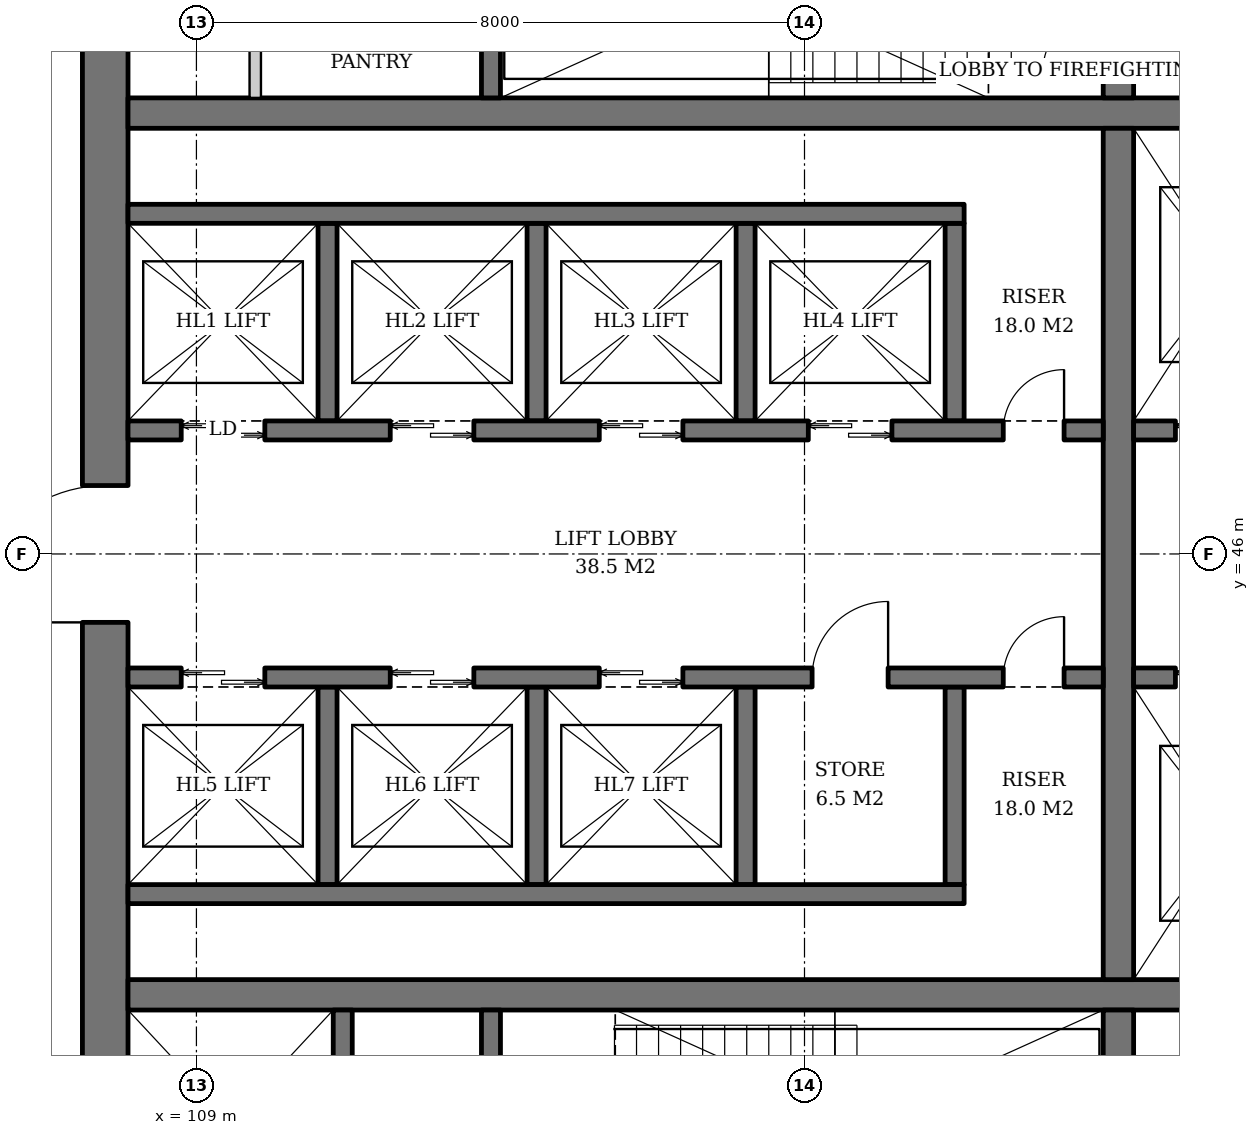
"""IFC4 building model, lengths in metres.
Left out: names, types, materials, properties, quantities, classifications, styles, units other than length and angle.
Written with IfcOpenShell. Run it as: python <this file> out.ifc"""

import sys

from ifc_helpers import new_model, si_unit, direction, frame, frame_2d, origin, place, context, subcontext, project, spatial, rectangle, extrude, element, fill, save


model = new_model("IFC4")
c1 = context("Model", 3, precision=1e-05, world=origin(), true_north=direction((0.0, 1.0)))
c2 = subcontext(c1, "Body", "Model", "MODEL_VIEW")
j1 = project(units=[si_unit("LENGTHUNIT", "METRE"), si_unit("PLANEANGLEUNIT", "RADIAN")], contexts=[c1])
p1 = place(None, origin())
s1 = spatial("IfcSite", under=j1, at=p1, CompositionType="ELEMENT")
p2 = place(p1, origin())
s2 = spatial("IfcBuilding", under=s1, at=p2, CompositionType="ELEMENT")
p3 = place(p2, frame((0.0, 0.0, 78.0)))
s3 = spatial("IfcBuildingStorey", under=s2, at=p3, CompositionType="ELEMENT", Elevation=78.0)
p4 = place(p3, frame((107.8, 37.1, 0.0), z_axis=(0.0, 0.0, 1.0), x_axis=(0.0, 1.0, 0.0)))
e1 = element("IfcWall", 1, at=p4, inside=s3, PredefinedType="SHEAR", context=c2, shape_type="SweptSolid", body=[
    extrude(rectangle(XDim=17.8, YDim=0.6, at=frame_2d((8.9, 0.0))), origin(), (0.0, 0.0, 1.0), 3.8),
])
p5 = place(p4, frame((8.0, 0.0, 0.0)))
e2 = element("IfcOpeningElement", 2, at=p5, cuts=e1, PredefinedType="OPENING", context=c2, shape_type="SweptSolid", body=[
    extrude(rectangle(XDim=1.8, YDim=2.4, at=frame_2d((0.9, 1.2))), frame((0.0, 0.31, 0.0), z_axis=(0.0, -1.0, 0.0), x_axis=(1.0, 0.0, 0.0)), (0.0, 0.0, 1.0), 0.62),
])
for number, where, z_axis, x_axis in (
    (3, (108.1, 40.2, 0.0), (0.0, 0.0, 1.0), (1.0, 0.0, 0.0)),
    (4, (108.1, 51.8, 0.0), (0.0, 0.0, 1.0), (1.0, 0.0, 0.0)),
):
    element("IfcWall", number, at=place(p3, frame(where, z_axis=z_axis, x_axis=x_axis)), inside=s3, PredefinedType="SHEAR", context=c2, shape_type="SweptSolid", body=[
        extrude(rectangle(XDim=17.8, YDim=0.4, at=frame_2d((8.9, 0.0))), origin(), (0.0, 0.0, 1.0), 3.8),
    ])
p6 = place(p3, frame((121.13, 37.1, 0.0), z_axis=(0.0, 0.0, 1.0), x_axis=(0.0, 1.0, 0.0)))
e5 = element("IfcWall", 5, at=p6, inside=s3, PredefinedType="SHEAR", context=c2, shape_type="SweptSolid", body=[
    extrude(rectangle(XDim=2.9, YDim=0.4, at=frame_2d((1.45, 0.0))), origin(), (0.0, 0.0, 1.0), 3.8),
])
p7 = place(p3, frame((121.13, 40.4, 0.0), z_axis=(0.0, 0.0, 1.0), x_axis=(0.0, 1.0, 0.0)))
e6 = element("IfcWall", 6, at=p7, inside=s3, PredefinedType="SHEAR", context=c2, shape_type="SweptSolid", body=[
    extrude(rectangle(XDim=11.2, YDim=0.4, at=frame_2d((5.6, 0.0))), origin(), (0.0, 0.0, 1.0), 3.8),
])
p8 = place(p3, frame((121.13, 52.0, 0.0), z_axis=(0.0, 0.0, 1.0), x_axis=(0.0, 1.0, 0.0)))
e7 = element("IfcWall", 7, at=p8, inside=s3, PredefinedType="SHEAR", context=c2, shape_type="SweptSolid", body=[
    extrude(rectangle(XDim=2.9, YDim=0.4, at=frame_2d((1.45, 0.0))), origin(), (0.0, 0.0, 1.0), 3.8),
])
p9 = place(p8, frame((0.3, 0.0, 0.0)))
e8 = element("IfcOpeningElement", 8, at=p9, cuts=e7, PredefinedType="OPENING", context=c2, shape_type="SweptSolid", body=[
    extrude(rectangle(XDim=1.0, YDim=2.1, at=frame_2d((0.5, 1.05))), frame((0.0, 0.21, 0.0), z_axis=(0.0, -1.0, 0.0), x_axis=(1.0, 0.0, 0.0)), (0.0, 0.0, 1.0), 0.42),
])
p10 = place(p3, frame((110.925, 37.1, 0.0), z_axis=(0.0, 0.0, 1.0), x_axis=(0.0, 1.0, 0.0)))
e9 = element("IfcWall", 9, at=p10, inside=s3, PredefinedType="SHEAR", context=c2, shape_type="SweptSolid", body=[
    extrude(rectangle(XDim=2.9, YDim=0.25, at=frame_2d((1.45, 0.0))), origin(), (0.0, 0.0, 1.0), 3.8),
])
p11 = place(p10, frame((0.8, 0.0, 0.0)))
e10 = element("IfcOpeningElement", 10, at=p11, cuts=e9, PredefinedType="OPENING", context=c2, shape_type="SweptSolid", body=[
    extrude(rectangle(XDim=1.3, YDim=2.2, at=frame_2d((0.65, 1.1))), frame((0.0, 0.135, 0.0), z_axis=(0.0, -1.0, 0.0), x_axis=(1.0, 0.0, 0.0)), (0.0, 0.0, 1.0), 0.27),
])
p12 = place(p3, frame((112.875, 37.1, 0.0), z_axis=(0.0, 0.0, 1.0), x_axis=(0.0, 1.0, 0.0)))
e11 = element("IfcWall", 11, at=p12, inside=s3, PredefinedType="SHEAR", context=c2, shape_type="SweptSolid", body=[
    extrude(rectangle(XDim=2.9, YDim=0.25, at=frame_2d((1.45, 0.0))), origin(), (0.0, 0.0, 1.0), 3.8),
])
p13 = place(p12, frame((0.75, 0.0, 0.0)))
e12 = element("IfcOpeningElement", 12, at=p13, cuts=e11, PredefinedType="OPENING", context=c2, shape_type="SweptSolid", body=[
    extrude(rectangle(XDim=1.2, YDim=2.1, at=frame_2d((0.6, 1.05))), frame((0.0, 0.135, 0.0), z_axis=(0.0, -1.0, 0.0), x_axis=(1.0, 0.0, 0.0)), (0.0, 0.0, 1.0), 0.27),
])
p14 = place(p3, frame((112.875, 52.0, 0.0), z_axis=(0.0, 0.0, 1.0), x_axis=(0.0, 1.0, 0.0)))
e13 = element("IfcWall", 13, at=p14, inside=s3, PredefinedType="SHEAR", context=c2, shape_type="SweptSolid", body=[
    extrude(rectangle(XDim=2.9, YDim=0.25, at=frame_2d((1.45, 0.0))), origin(), (0.0, 0.0, 1.0), 3.8),
])
for number, where, z_axis, x_axis in (
    (14, (110.725, 47.75, 0.0), (0.0, 0.0, 1.0), (0.0, 1.0, 0.0)),
    (15, (113.475, 47.75, 0.0), (0.0, 0.0, 1.0), (0.0, 1.0, 0.0)),
    (16, (116.225, 47.75, 0.0), (0.0, 0.0, 1.0), (0.0, 1.0, 0.0)),
    (17, (118.975, 47.75, 0.0), (0.0, 0.0, 1.0), (0.0, 1.0, 0.0)),
):
    element("IfcWall", number, at=place(p3, frame(where, z_axis=z_axis, x_axis=x_axis)), inside=s3, PredefinedType="SHEAR", context=c2, shape_type="SweptSolid", body=[
        extrude(rectangle(XDim=2.6, YDim=0.25, at=frame_2d((1.3, 0.0))), origin(), (0.0, 0.0, 1.0), 3.8),
    ])
p15 = place(p3, frame((108.1, 50.475, 0.0), z_axis=(0.0, 0.0, 1.0), x_axis=(1.0, 0.0, 0.0)))
e18 = element("IfcWall", 18, at=p15, inside=s3, PredefinedType="SHEAR", context=c2, shape_type="SweptSolid", body=[
    extrude(rectangle(XDim=11.0, YDim=0.25, at=frame_2d((5.5, 0.0))), origin(), (0.0, 0.0, 1.0), 3.8),
])
p16 = place(p3, frame((108.1, 47.625, 0.0), z_axis=(0.0, 0.0, 1.0), x_axis=(1.0, 0.0, 0.0)))
e19 = element("IfcWall", 19, at=p16, inside=s3, PredefinedType="SHEAR", context=c2, shape_type="SweptSolid", body=[
    extrude(rectangle(XDim=12.83, YDim=0.25, at=frame_2d((6.415, 0.0))), origin(), (0.0, 0.0, 1.0), 3.8),
])
p17 = place(p16, frame((0.7, 0.0, 0.0)))
e20 = element("IfcOpeningElement", 20, at=p17, cuts=e19, PredefinedType="OPENING", context=c2, shape_type="SweptSolid", body=[
    extrude(rectangle(XDim=1.1, YDim=2.2, at=frame_2d((0.55, 1.1))), frame((0.0, 0.135, 0.0), z_axis=(0.0, -1.0, 0.0), x_axis=(1.0, 0.0, 0.0)), (0.0, 0.0, 1.0), 0.27),
])
p18 = place(p16, frame((3.45, 0.0, 0.0)))
e21 = element("IfcOpeningElement", 21, at=p18, cuts=e19, PredefinedType="OPENING", context=c2, shape_type="SweptSolid", body=[
    extrude(rectangle(XDim=1.1, YDim=2.2, at=frame_2d((0.55, 1.1))), frame((0.0, 0.135, 0.0), z_axis=(0.0, -1.0, 0.0), x_axis=(1.0, 0.0, 0.0)), (0.0, 0.0, 1.0), 0.27),
])
p19 = place(p16, frame((6.2, 0.0, 0.0)))
e22 = element("IfcOpeningElement", 22, at=p19, cuts=e19, PredefinedType="OPENING", context=c2, shape_type="SweptSolid", body=[
    extrude(rectangle(XDim=1.1, YDim=2.2, at=frame_2d((0.55, 1.1))), frame((0.0, 0.135, 0.0), z_axis=(0.0, -1.0, 0.0), x_axis=(1.0, 0.0, 0.0)), (0.0, 0.0, 1.0), 0.27),
])
p20 = place(p16, frame((8.95, 0.0, 0.0)))
e23 = element("IfcOpeningElement", 23, at=p20, cuts=e19, PredefinedType="OPENING", context=c2, shape_type="SweptSolid", body=[
    extrude(rectangle(XDim=1.1, YDim=2.2, at=frame_2d((0.55, 1.1))), frame((0.0, 0.135, 0.0), z_axis=(0.0, -1.0, 0.0), x_axis=(1.0, 0.0, 0.0)), (0.0, 0.0, 1.0), 0.27),
])
p21 = place(p16, frame((11.515, 0.0, 0.0)))
e24 = element("IfcOpeningElement", 24, at=p21, cuts=e19, PredefinedType="OPENING", context=c2, shape_type="SweptSolid", body=[
    extrude(rectangle(XDim=0.8, YDim=2.0, at=frame_2d((0.4, 1.0))), frame((0.0, 0.135, 0.0), z_axis=(0.0, -1.0, 0.0), x_axis=(1.0, 0.0, 0.0)), (0.0, 0.0, 1.0), 0.27),
])
for number, where, z_axis, x_axis in (
    (25, (110.725, 44.25, 0.0), (0.0, 0.0, 1.0), (0.0, -1.0, 0.0)),
    (26, (113.475, 44.25, 0.0), (0.0, 0.0, 1.0), (0.0, -1.0, 0.0)),
    (27, (116.225, 44.25, 0.0), (0.0, 0.0, 1.0), (0.0, -1.0, 0.0)),
    (28, (118.975, 44.25, 0.0), (0.0, 0.0, 1.0), (0.0, -1.0, 0.0)),
):
    element("IfcWall", number, at=place(p3, frame(where, z_axis=z_axis, x_axis=x_axis)), inside=s3, PredefinedType="SHEAR", context=c2, shape_type="SweptSolid", body=[
        extrude(rectangle(XDim=2.6, YDim=0.25, at=frame_2d((1.3, 0.0))), origin(), (0.0, 0.0, 1.0), 3.8),
    ])
p22 = place(p3, frame((108.1, 41.525, 0.0), z_axis=(0.0, 0.0, 1.0), x_axis=(1.0, 0.0, 0.0)))
e29 = element("IfcWall", 29, at=p22, inside=s3, PredefinedType="SHEAR", context=c2, shape_type="SweptSolid", body=[
    extrude(rectangle(XDim=11.0, YDim=0.25, at=frame_2d((5.5, 0.0))), origin(), (0.0, 0.0, 1.0), 3.8),
])
p23 = place(p3, frame((108.1, 44.375, 0.0), z_axis=(0.0, 0.0, 1.0), x_axis=(1.0, 0.0, 0.0)))
e30 = element("IfcWall", 30, at=p23, inside=s3, PredefinedType="SHEAR", context=c2, shape_type="SweptSolid", body=[
    extrude(rectangle(XDim=12.83, YDim=0.25, at=frame_2d((6.415, 0.0))), origin(), (0.0, 0.0, 1.0), 3.8),
])
p24 = place(p23, frame((0.7, 0.0, 0.0)))
e31 = element("IfcOpeningElement", 31, at=p24, cuts=e30, PredefinedType="OPENING", context=c2, shape_type="SweptSolid", body=[
    extrude(rectangle(XDim=1.1, YDim=2.2, at=frame_2d((0.55, 1.1))), frame((0.0, 0.135, 0.0), z_axis=(0.0, -1.0, 0.0), x_axis=(1.0, 0.0, 0.0)), (0.0, 0.0, 1.0), 0.27),
])
p25 = place(p23, frame((3.45, 0.0, 0.0)))
e32 = element("IfcOpeningElement", 32, at=p25, cuts=e30, PredefinedType="OPENING", context=c2, shape_type="SweptSolid", body=[
    extrude(rectangle(XDim=1.1, YDim=2.2, at=frame_2d((0.55, 1.1))), frame((0.0, 0.135, 0.0), z_axis=(0.0, -1.0, 0.0), x_axis=(1.0, 0.0, 0.0)), (0.0, 0.0, 1.0), 0.27),
])
p26 = place(p23, frame((6.2, 0.0, 0.0)))
e33 = element("IfcOpeningElement", 33, at=p26, cuts=e30, PredefinedType="OPENING", context=c2, shape_type="SweptSolid", body=[
    extrude(rectangle(XDim=1.1, YDim=2.2, at=frame_2d((0.55, 1.1))), frame((0.0, 0.135, 0.0), z_axis=(0.0, -1.0, 0.0), x_axis=(1.0, 0.0, 0.0)), (0.0, 0.0, 1.0), 0.27),
])
p27 = place(p23, frame((9.0, 0.0, 0.0)))
e34 = element("IfcOpeningElement", 34, at=p27, cuts=e30, PredefinedType="OPENING", context=c2, shape_type="SweptSolid", body=[
    extrude(rectangle(XDim=1.0, YDim=2.1, at=frame_2d((0.5, 1.05))), frame((0.0, 0.135, 0.0), z_axis=(0.0, -1.0, 0.0), x_axis=(1.0, 0.0, 0.0)), (0.0, 0.0, 1.0), 0.27),
])
p28 = place(p23, frame((11.515, 0.0, 0.0)))
e35 = element("IfcOpeningElement", 35, at=p28, cuts=e30, PredefinedType="OPENING", context=c2, shape_type="SweptSolid", body=[
    extrude(rectangle(XDim=0.8, YDim=2.0, at=frame_2d((0.4, 1.0))), frame((0.0, 0.135, 0.0), z_axis=(0.0, -1.0, 0.0), x_axis=(1.0, 0.0, 0.0)), (0.0, 0.0, 1.0), 0.27),
])
p29 = place(p3, frame((121.33, 47.625, 0.0), z_axis=(0.0, 0.0, 1.0), x_axis=(1.0, 0.0, 0.0)))
e36 = element("IfcWall", 36, at=p29, inside=s3, PredefinedType="SHEAR", context=c2, shape_type="SweptSolid", body=[
    extrude(rectangle(XDim=4.57, YDim=0.25, at=frame_2d((2.285, 0.0))), origin(), (0.0, 0.0, 1.0), 3.8),
])
p30 = place(p29, frame((0.55, 0.0, 0.0)))
e37 = element("IfcOpeningElement", 37, at=p30, cuts=e36, PredefinedType="OPENING", context=c2, shape_type="SweptSolid", body=[
    extrude(rectangle(XDim=1.4, YDim=2.4, at=frame_2d((0.7, 1.2))), frame((0.0, 0.135, 0.0), z_axis=(0.0, -1.0, 0.0), x_axis=(1.0, 0.0, 0.0)), (0.0, 0.0, 1.0), 0.27),
])
p31 = place(p29, frame((3.26, 0.0, 0.0)))
e38 = element("IfcOpeningElement", 38, at=p31, cuts=e36, PredefinedType="OPENING", context=c2, shape_type="SweptSolid", body=[
    extrude(rectangle(XDim=0.8, YDim=2.0, at=frame_2d((0.4, 1.0))), frame((0.0, 0.135, 0.0), z_axis=(0.0, -1.0, 0.0), x_axis=(1.0, 0.0, 0.0)), (0.0, 0.0, 1.0), 0.27),
])
p32 = place(p3, frame((121.33, 44.375, 0.0), z_axis=(0.0, 0.0, 1.0), x_axis=(1.0, 0.0, 0.0)))
e39 = element("IfcWall", 39, at=p32, inside=s3, PredefinedType="SHEAR", context=c2, shape_type="SweptSolid", body=[
    extrude(rectangle(XDim=4.57, YDim=0.25, at=frame_2d((2.285, 0.0))), origin(), (0.0, 0.0, 1.0), 3.8),
])
p33 = place(p32, frame((0.55, 0.0, 0.0)))
e40 = element("IfcOpeningElement", 40, at=p33, cuts=e39, PredefinedType="OPENING", context=c2, shape_type="SweptSolid", body=[
    extrude(rectangle(XDim=1.4, YDim=2.4, at=frame_2d((0.7, 1.2))), frame((0.0, 0.135, 0.0), z_axis=(0.0, -1.0, 0.0), x_axis=(1.0, 0.0, 0.0)), (0.0, 0.0, 1.0), 0.27),
])
p34 = place(p32, frame((3.26, 0.0, 0.0)))
e41 = element("IfcOpeningElement", 41, at=p34, cuts=e39, PredefinedType="OPENING", context=c2, shape_type="SweptSolid", body=[
    extrude(rectangle(XDim=0.8, YDim=2.0, at=frame_2d((0.4, 1.0))), frame((0.0, 0.135, 0.0), z_axis=(0.0, -1.0, 0.0), x_axis=(1.0, 0.0, 0.0)), (0.0, 0.0, 1.0), 0.27),
])
p35 = place(p3, frame((109.774, 52.0, 0.0), z_axis=(0.0, 0.0, 1.0), x_axis=(0.0, 1.0, 0.0)))
e42 = element("IfcWall", 42, at=p35, inside=s3, PredefinedType="SOLIDWALL", context=c2, shape_type="SweptSolid", body=[
    extrude(rectangle(XDim=2.9, YDim=0.15, at=frame_2d((1.45, 0.0))), origin(), (0.0, 0.0, 1.0), 3.52),
])
p36 = place(p17, origin())
e43 = element("IfcDoor", 43, at=p36, inside=s3, OperationType="DOUBLE_DOOR_SLIDING", PredefinedType="DOOR", context=c2, shape_type="SweptSolid", body=[
    extrude(rectangle(XDim=1.1, YDim=2.2, at=frame_2d((0.55, 1.1))), frame((0.0, 0.025, 0.0), z_axis=(0.0, -1.0, 0.0), x_axis=(1.0, 0.0, 0.0)), (0.0, 0.0, 1.0), 0.05),
])
fill(e20, e43)
p37 = place(p18, origin())
e44 = element("IfcDoor", 44, at=p37, inside=s3, OperationType="DOUBLE_DOOR_SLIDING", PredefinedType="DOOR", context=c2, shape_type="SweptSolid", body=[
    extrude(rectangle(XDim=1.1, YDim=2.2, at=frame_2d((0.55, 1.1))), frame((0.0, 0.025, 0.0), z_axis=(0.0, -1.0, 0.0), x_axis=(1.0, 0.0, 0.0)), (0.0, 0.0, 1.0), 0.05),
])
fill(e21, e44)
p38 = place(p19, origin())
e45 = element("IfcDoor", 45, at=p38, inside=s3, OperationType="DOUBLE_DOOR_SLIDING", PredefinedType="DOOR", context=c2, shape_type="SweptSolid", body=[
    extrude(rectangle(XDim=1.1, YDim=2.2, at=frame_2d((0.55, 1.1))), frame((0.0, 0.025, 0.0), z_axis=(0.0, -1.0, 0.0), x_axis=(1.0, 0.0, 0.0)), (0.0, 0.0, 1.0), 0.05),
])
fill(e22, e45)
p39 = place(p20, origin())
e46 = element("IfcDoor", 46, at=p39, inside=s3, OperationType="DOUBLE_DOOR_SLIDING", PredefinedType="DOOR", context=c2, shape_type="SweptSolid", body=[
    extrude(rectangle(XDim=1.1, YDim=2.2, at=frame_2d((0.55, 1.1))), frame((0.0, 0.025, 0.0), z_axis=(0.0, -1.0, 0.0), x_axis=(1.0, 0.0, 0.0)), (0.0, 0.0, 1.0), 0.05),
])
fill(e23, e46)
p40 = place(p21, origin())
e47 = element("IfcDoor", 47, at=p40, inside=s3, OperationType="SINGLE_SWING_RIGHT", PredefinedType="DOOR", context=c2, shape_type="SweptSolid", body=[
    extrude(rectangle(XDim=0.8, YDim=2.0, at=frame_2d((0.4, 1.0))), frame((0.0, 0.025, 0.0), z_axis=(0.0, -1.0, 0.0), x_axis=(1.0, 0.0, 0.0)), (0.0, 0.0, 1.0), 0.05),
])
fill(e24, e47)
p41 = place(p24, origin())
e48 = element("IfcDoor", 48, at=p41, inside=s3, OperationType="DOUBLE_DOOR_SLIDING", PredefinedType="DOOR", context=c2, shape_type="SweptSolid", body=[
    extrude(rectangle(XDim=1.1, YDim=2.2, at=frame_2d((0.55, 1.1))), frame((0.0, 0.025, 0.0), z_axis=(0.0, -1.0, 0.0), x_axis=(1.0, 0.0, 0.0)), (0.0, 0.0, 1.0), 0.05),
])
fill(e31, e48)
p42 = place(p25, origin())
e49 = element("IfcDoor", 49, at=p42, inside=s3, OperationType="DOUBLE_DOOR_SLIDING", PredefinedType="DOOR", context=c2, shape_type="SweptSolid", body=[
    extrude(rectangle(XDim=1.1, YDim=2.2, at=frame_2d((0.55, 1.1))), frame((0.0, 0.025, 0.0), z_axis=(0.0, -1.0, 0.0), x_axis=(1.0, 0.0, 0.0)), (0.0, 0.0, 1.0), 0.05),
])
fill(e32, e49)
p43 = place(p26, origin())
e50 = element("IfcDoor", 50, at=p43, inside=s3, OperationType="DOUBLE_DOOR_SLIDING", PredefinedType="DOOR", context=c2, shape_type="SweptSolid", body=[
    extrude(rectangle(XDim=1.1, YDim=2.2, at=frame_2d((0.55, 1.1))), frame((0.0, 0.025, 0.0), z_axis=(0.0, -1.0, 0.0), x_axis=(1.0, 0.0, 0.0)), (0.0, 0.0, 1.0), 0.05),
])
fill(e33, e50)
p44 = place(p27, origin())
e51 = element("IfcDoor", 51, at=p44, inside=s3, OperationType="SINGLE_SWING_RIGHT", PredefinedType="DOOR", context=c2, shape_type="SweptSolid", body=[
    extrude(rectangle(XDim=1.0, YDim=2.1, at=frame_2d((0.5, 1.05))), frame((0.0, 0.025, 0.0), z_axis=(0.0, -1.0, 0.0), x_axis=(1.0, 0.0, 0.0)), (0.0, 0.0, 1.0), 0.05),
])
fill(e34, e51)
p45 = place(p28, origin())
e52 = element("IfcDoor", 52, at=p45, inside=s3, OperationType="SINGLE_SWING_RIGHT", PredefinedType="DOOR", context=c2, shape_type="SweptSolid", body=[
    extrude(rectangle(XDim=0.8, YDim=2.0, at=frame_2d((0.4, 1.0))), frame((0.0, 0.025, 0.0), z_axis=(0.0, -1.0, 0.0), x_axis=(1.0, 0.0, 0.0)), (0.0, 0.0, 1.0), 0.05),
])
fill(e35, e52)
p46 = place(p30, origin())
e53 = element("IfcDoor", 53, at=p46, inside=s3, OperationType="DOUBLE_DOOR_SLIDING", PredefinedType="DOOR", context=c2, shape_type="SweptSolid", body=[
    extrude(rectangle(XDim=1.4, YDim=2.4, at=frame_2d((0.7, 1.2))), frame((0.0, 0.025, 0.0), z_axis=(0.0, -1.0, 0.0), x_axis=(1.0, 0.0, 0.0)), (0.0, 0.0, 1.0), 0.05),
])
fill(e37, e53)
p47 = place(p33, origin())
e54 = element("IfcDoor", 54, at=p47, inside=s3, OperationType="DOUBLE_DOOR_SLIDING", PredefinedType="DOOR", context=c2, shape_type="SweptSolid", body=[
    extrude(rectangle(XDim=1.4, YDim=2.4, at=frame_2d((0.7, 1.2))), frame((0.0, 0.025, 0.0), z_axis=(0.0, -1.0, 0.0), x_axis=(1.0, 0.0, 0.0)), (0.0, 0.0, 1.0), 0.05),
])
fill(e40, e54)
p48 = place(p9, origin())
e55 = element("IfcDoor", 55, at=p48, inside=s3, OperationType="SINGLE_SWING_LEFT", PredefinedType="DOOR", context=c2, shape_type="SweptSolid", body=[
    extrude(rectangle(XDim=1.0, YDim=2.1, at=frame_2d((0.5, 1.05))), frame((0.0, 0.025, 0.0), z_axis=(0.0, -1.0, 0.0), x_axis=(1.0, 0.0, 0.0)), (0.0, 0.0, 1.0), 0.05),
])
fill(e8, e55)
p49 = place(p5, origin())
e56 = element("IfcDoor", 56, at=p49, inside=s3, OperationType="DOUBLE_DOOR_SINGLE_SWING", PredefinedType="DOOR", context=c2, shape_type="SweptSolid", body=[
    extrude(rectangle(XDim=1.8, YDim=2.4, at=frame_2d((0.9, 1.2))), frame((0.0, 0.025, 0.0), z_axis=(0.0, -1.0, 0.0), x_axis=(1.0, 0.0, 0.0)), (0.0, 0.0, 1.0), 0.05),
])
fill(e2, e56)
save(model, sys.argv[1])
